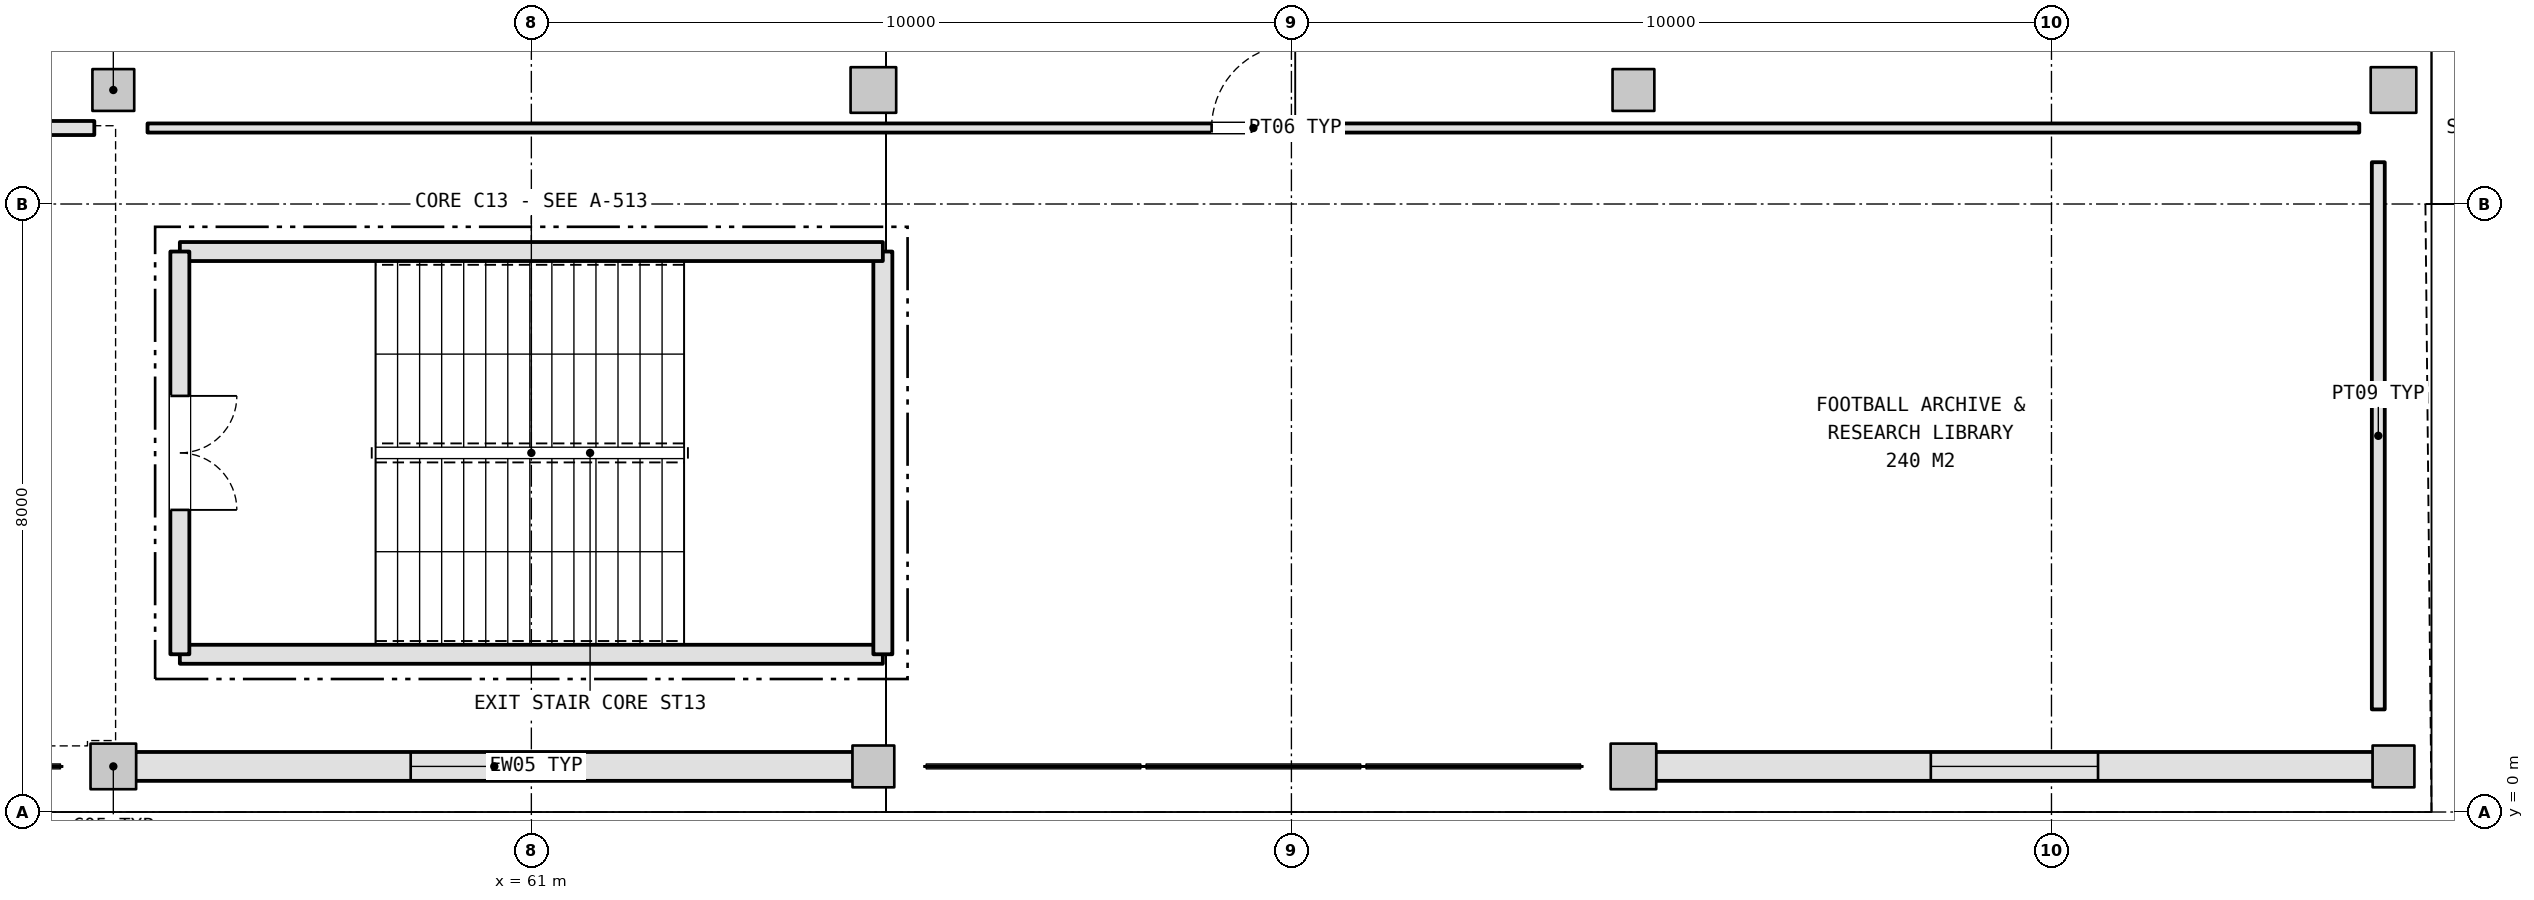
"""IFC4 building model, lengths in metres.
Left out: names, types, materials, properties, quantities, classifications, styles, units other than length and angle.
Written with IfcOpenShell. Run it as: python <this file> out.ifc"""

import sys

from ifc_helpers import new_model, si_unit, direction, frame, frame_2d, origin, origin_2d, place, context, subcontext, project, spatial, rectangle, extrude, element, fill, save


model = new_model("IFC4")
c1 = context("Model", 3, precision=1e-05, world=origin(), true_north=direction((0.0, 1.0)))
c2 = subcontext(c1, "Body", "Model", "MODEL_VIEW")
j1 = project(units=[si_unit("LENGTHUNIT", "METRE"), si_unit("PLANEANGLEUNIT", "RADIAN")], contexts=[c1])
p1 = place(None, origin())
s1 = spatial("IfcSite", under=j1, at=p1, CompositionType="ELEMENT")
p2 = place(p1, origin())
s2 = spatial("IfcBuilding", under=s1, at=p2, CompositionType="ELEMENT")
p3 = place(p2, frame((0.0, 0.0, 16.2)))
s3 = spatial("IfcBuildingStorey", under=s2, at=p3, CompositionType="ELEMENT", Elevation=16.2)
p4 = place(p3, frame((55.5, 0.6, 0.0), z_axis=(0.0, 0.0, 1.0), x_axis=(1.0, 0.0, 0.0)))
e1 = element("IfcColumn", 1, at=p4, inside=s3, PredefinedType="COLUMN", context=c2, shape_type="SweptSolid", body=[
    extrude(rectangle(XDim=0.6, YDim=0.6, at=origin_2d()), origin(), (0.0, 0.0, 1.0), 5.4),
])
for number, where, z_axis, x_axis in (
    (2, (55.5, 9.5, 0.0), (0.0, 0.0, 1.0), (1.0, 0.0, 0.0)),
    (3, (65.5, 0.6, 0.0), (0.0, 0.0, 1.0), (1.0, 0.0, 0.0)),
):
    element("IfcColumn", number, at=place(p3, frame(where, z_axis=z_axis, x_axis=x_axis)), inside=s3, PredefinedType="COLUMN", context=c2, shape_type="SweptSolid", body=[
        extrude(rectangle(XDim=0.55, YDim=0.55, at=origin_2d()), origin(), (0.0, 0.0, 1.0), 5.4),
    ])
for number, where, z_axis, x_axis in (
    (4, (65.5, 9.5, 0.0), (0.0, 0.0, 1.0), (1.0, 0.0, 0.0)),
    (5, (75.5, 0.6, 0.0), (0.0, 0.0, 1.0), (1.0, 0.0, 0.0)),
):
    element("IfcColumn", number, at=place(p3, frame(where, z_axis=z_axis, x_axis=x_axis)), inside=s3, PredefinedType="COLUMN", context=c2, shape_type="SweptSolid", body=[
        extrude(rectangle(XDim=0.6, YDim=0.6, at=origin_2d()), origin(), (0.0, 0.0, 1.0), 5.4),
    ])
for number, where, z_axis, x_axis in (
    (6, (75.5, 9.5, 0.0), (0.0, 0.0, 1.0), (1.0, 0.0, 0.0)),
    (7, (85.5, 0.6, 0.0), (0.0, 0.0, 1.0), (1.0, 0.0, 0.0)),
):
    element("IfcColumn", number, at=place(p3, frame(where, z_axis=z_axis, x_axis=x_axis)), inside=s3, PredefinedType="COLUMN", context=c2, shape_type="SweptSolid", body=[
        extrude(rectangle(XDim=0.55, YDim=0.55, at=origin_2d()), origin(), (0.0, 0.0, 1.0), 5.4),
    ])
p5 = place(p3, frame((85.5, 9.5, 0.0), z_axis=(0.0, 0.0, 1.0), x_axis=(1.0, 0.0, 0.0)))
e8 = element("IfcColumn", 8, at=p5, inside=s3, PredefinedType="COLUMN", context=c2, shape_type="SweptSolid", body=[
    extrude(rectangle(XDim=0.6, YDim=0.6, at=origin_2d()), origin(), (0.0, 0.0, 1.0), 5.4),
])
p6 = place(p3, frame((55.788, 0.6, 0.0), z_axis=(0.0, 0.0, 1.0), x_axis=(1.0, 0.0, 0.0)))
e9 = element("IfcWall", 9, at=p6, inside=s3, PredefinedType="SOLIDWALL", context=c2, shape_type="SweptSolid", body=[
    extrude(rectangle(XDim=9.449, YDim=0.38, at=frame_2d((4.725, 0.0))), origin(), (0.0, 0.0, 1.0), 4.405),
])
p7 = place(p6, frame((3.625, 0.0, 1.05)))
e10 = element("IfcOpeningElement", 10, at=p7, cuts=e9, PredefinedType="OPENING", context=c2, shape_type="SweptSolid", body=[
    extrude(rectangle(XDim=2.2, YDim=1.8, at=frame_2d((1.1, 0.9))), frame((0.0, 0.2, 0.0), z_axis=(0.0, -1.0, 0.0), x_axis=(1.0, 0.0, 0.0)), (0.0, 0.0, 1.0), 0.4),
])
p8 = place(p3, frame((75.788, 0.6, 0.0), z_axis=(0.0, 0.0, 1.0), x_axis=(1.0, 0.0, 0.0)))
e11 = element("IfcWall", 11, at=p8, inside=s3, PredefinedType="SOLIDWALL", context=c2, shape_type="SweptSolid", body=[
    extrude(rectangle(XDim=9.449, YDim=0.38, at=frame_2d((4.725, 0.0))), origin(), (0.0, 0.0, 1.0), 4.405),
])
p9 = place(p8, frame((3.625, 0.0, 1.05)))
e12 = element("IfcOpeningElement", 12, at=p9, cuts=e11, PredefinedType="OPENING", context=c2, shape_type="SweptSolid", body=[
    extrude(rectangle(XDim=2.2, YDim=1.8, at=frame_2d((1.1, 0.9))), frame((0.0, 0.2, 0.0), z_axis=(0.0, -1.0, 0.0), x_axis=(1.0, 0.0, 0.0)), (0.0, 0.0, 1.0), 0.4),
])
p10 = place(p3, frame((56.375, 2.075, 0.0), z_axis=(0.0, 0.0, 1.0), x_axis=(1.0, 0.0, 0.0)))
e13 = element("IfcWall", 13, at=p10, inside=s3, PredefinedType="SHEAR", context=c2, shape_type="SweptSolid", body=[
    extrude(rectangle(XDim=9.249, YDim=0.25, at=frame_2d((4.625, 0.0))), origin(), (0.0, 0.0, 1.0), 5.14),
])
p11 = place(p3, frame((65.625, 2.075, 0.0), z_axis=(0.0, 0.0, 1.0), x_axis=(0.0, 1.0, 0.0)))
e14 = element("IfcWall", 14, at=p11, inside=s3, PredefinedType="SHEAR", context=c2, shape_type="SweptSolid", body=[
    extrude(rectangle(XDim=5.299, YDim=0.25, at=frame_2d((2.649, 0.0))), origin(), (0.0, 0.0, 1.0), 5.14),
])
p12 = place(p3, frame((65.625, 7.375, 0.0), z_axis=(0.0, 0.0, 1.0), x_axis=(-1.0, 0.0, 0.0)))
e15 = element("IfcWall", 15, at=p12, inside=s3, PredefinedType="SHEAR", context=c2, shape_type="SweptSolid", body=[
    extrude(rectangle(XDim=9.249, YDim=0.25, at=frame_2d((4.625, 0.0))), origin(), (0.0, 0.0, 1.0), 5.14),
])
p13 = place(p3, frame((56.375, 7.375, 0.0), z_axis=(0.0, 0.0, 1.0), x_axis=(0.0, -1.0, 0.0)))
e16 = element("IfcWall", 16, at=p13, inside=s3, PredefinedType="SHEAR", context=c2, shape_type="SweptSolid", body=[
    extrude(rectangle(XDim=5.299, YDim=0.25, at=frame_2d((2.649, 0.0))), origin(), (0.0, 0.0, 1.0), 5.14),
])
p14 = place(p13, frame((1.9, 0.0, 0.0)))
e17 = element("IfcOpeningElement", 17, at=p14, cuts=e16, PredefinedType="OPENING", context=c2, shape_type="SweptSolid", body=[
    extrude(rectangle(XDim=1.5, YDim=2.2, at=frame_2d((0.75, 1.1))), frame((0.0, 0.135, 0.0), z_axis=(0.0, -1.0, 0.0), x_axis=(1.0, 0.0, 0.0)), (0.0, 0.0, 1.0), 0.27),
])
p15 = place(p3, frame((25.95, 9.0, 0.0), z_axis=(0.0, 0.0, 1.0), x_axis=(1.0, 0.0, 0.0)))
e18 = element("IfcWall", 18, at=p15, inside=s3, PredefinedType="PARTITIONING", context=c2, shape_type="SweptSolid", body=[
    extrude(rectangle(XDim=29.3, YDim=0.185, at=frame_2d((14.65, 0.0))), origin(), (0.0, 0.0, 1.0), 4.405),
])
p16 = place(p15, frame((14.075, 0.0, 0.0)))
e19 = element("IfcOpeningElement", 19, at=p16, cuts=e18, PredefinedType="OPENING", context=c2, shape_type="SweptSolid", body=[
    extrude(rectangle(XDim=1.15, YDim=2.2, at=frame_2d((0.575, 1.1))), frame((0.0, 0.103, 0.0), z_axis=(0.0, -1.0, 0.0), x_axis=(1.0, 0.0, 0.0)), (0.0, 0.0, 1.0), 0.205),
])
p17 = place(p3, frame((55.95, 9.0, 0.0), z_axis=(0.0, 0.0, 1.0), x_axis=(1.0, 0.0, 0.0)))
e20 = element("IfcWall", 20, at=p17, inside=s3, PredefinedType="PARTITIONING", context=c2, shape_type="SweptSolid", body=[
    extrude(rectangle(XDim=29.1, YDim=0.12, at=frame_2d((14.55, 0.0))), origin(), (0.0, 0.0, 1.0), 4.405),
])
p18 = place(p17, frame((14.0, 0.0, 0.0)))
e21 = element("IfcOpeningElement", 21, at=p18, cuts=e20, PredefinedType="OPENING", context=c2, shape_type="SweptSolid", body=[
    extrude(rectangle(XDim=1.1, YDim=2.15, at=frame_2d((0.55, 1.075))), frame((0.0, 0.07, 0.0), z_axis=(0.0, -1.0, 0.0), x_axis=(1.0, 0.0, 0.0)), (0.0, 0.0, 1.0), 0.14),
])
p19 = place(p3, frame((85.3, 8.55, 0.0), z_axis=(0.0, 0.0, 1.0), x_axis=(0.0, -1.0, 0.0)))
e22 = element("IfcWall", 22, at=p19, inside=s3, PredefinedType="PARTITIONING", context=c2, shape_type="SweptSolid", body=[
    extrude(rectangle(XDim=7.2, YDim=0.17, at=frame_2d((3.6, 0.0))), origin(), (0.0, 0.0, 1.0), 4.455),
])
p20 = place(p7, origin())
e23 = element("IfcWindow", 23, at=p20, inside=s3, PartitioningType="SINGLE_PANEL", PredefinedType="WINDOW", context=c2, shape_type="SweptSolid", body=[
    extrude(rectangle(XDim=2.2, YDim=1.8, at=frame_2d((1.1, 0.9))), frame((0.0, 0.03, 0.0), z_axis=(0.0, -1.0, 0.0), x_axis=(1.0, 0.0, 0.0)), (0.0, 0.0, 1.0), 0.06),
])
fill(e10, e23)
p21 = place(p9, origin())
e24 = element("IfcWindow", 24, at=p21, inside=s3, PartitioningType="SINGLE_PANEL", PredefinedType="WINDOW", context=c2, shape_type="SweptSolid", body=[
    extrude(rectangle(XDim=2.2, YDim=1.8, at=frame_2d((1.1, 0.9))), frame((0.0, 0.03, 0.0), z_axis=(0.0, -1.0, 0.0), x_axis=(1.0, 0.0, 0.0)), (0.0, 0.0, 1.0), 0.06),
])
fill(e12, e24)
p22 = place(p14, origin())
e25 = element("IfcDoor", 25, at=p22, inside=s3, OperationType="DOUBLE_DOOR_SINGLE_SWING", PredefinedType="DOOR", context=c2, shape_type="SweptSolid", body=[
    extrude(rectangle(XDim=1.5, YDim=2.2, at=frame_2d((0.75, 1.1))), frame((0.0, 0.025, 0.0), z_axis=(0.0, -1.0, 0.0), x_axis=(1.0, 0.0, 0.0)), (0.0, 0.0, 1.0), 0.05),
])
fill(e17, e25)
p23 = place(p18, origin())
e26 = element("IfcDoor", 26, at=p23, inside=s3, OperationType="SINGLE_SWING_RIGHT", PredefinedType="DOOR", context=c2, shape_type="SweptSolid", body=[
    extrude(rectangle(XDim=1.1, YDim=2.15, at=frame_2d((0.55, 1.075))), frame((0.0, 0.025, 0.0), z_axis=(0.0, -1.0, 0.0), x_axis=(1.0, 0.0, 0.0)), (0.0, 0.0, 1.0), 0.05),
])
fill(e21, e26)
save(model, sys.argv[1])
